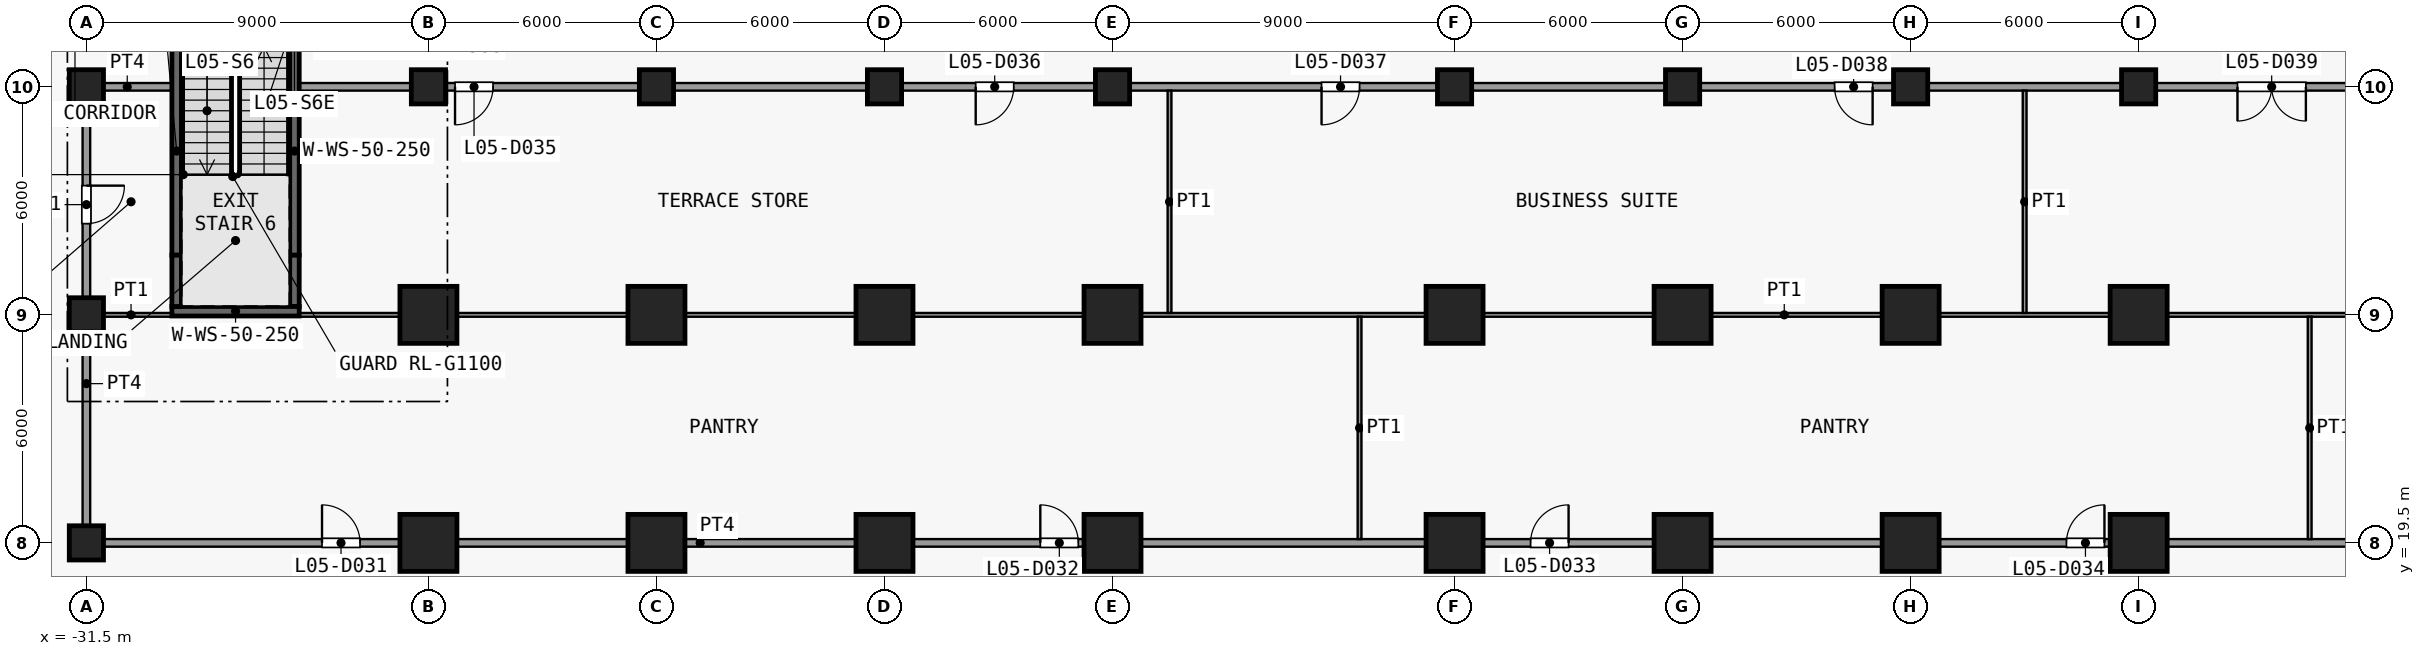
"""IFC4 building model, lengths in metres.
Left out: names, types, materials, properties, quantities, classifications, styles, units other than length and angle.
Written with IfcOpenShell. Run it as: python <this file> out.ifc"""

import sys

from ifc_helpers import new_model, si_unit, direction, frame, frame_2d, origin, origin_2d, place, context, subcontext, project, spatial, rectangle, extrude, element, fill, save


model = new_model("IFC4")
c1 = context("Model", 3, precision=1e-05, world=origin(), true_north=direction((0.0, 1.0)))
c2 = subcontext(c1, "Body", "Model", "MODEL_VIEW")
j1 = project(units=[si_unit("LENGTHUNIT", "METRE"), si_unit("PLANEANGLEUNIT", "RADIAN")], contexts=[c1])
p1 = place(None, origin())
s1 = spatial("IfcSite", under=j1, at=p1, CompositionType="ELEMENT")
p2 = place(p1, origin())
s2 = spatial("IfcBuilding", under=s1, at=p2, CompositionType="ELEMENT")
p3 = place(p2, frame((0.0, 0.0, 28.0)))
s3 = spatial("IfcBuildingStorey", under=s2, at=p3, CompositionType="ELEMENT", Elevation=28.0)
for number, where, z_axis, x_axis in (
    (1, (-31.5, 19.5, 0.0), (0.0, 0.0, 1.0), (1.0, 0.0, 0.0)),
    (2, (-31.5, 25.5, 0.0), (0.0, 0.0, 1.0), (1.0, 0.0, 0.0)),
    (3, (-31.5, 31.5, 0.0), (0.0, 0.0, 1.0), (1.0, 0.0, 0.0)),
):
    element("IfcColumn", number, at=place(p3, frame(where, z_axis=z_axis, x_axis=x_axis)), inside=s3, PredefinedType="COLUMN", context=c2, shape_type="SweptSolid", body=[
        extrude(rectangle(XDim=0.9, YDim=0.9, at=origin_2d()), origin(), (0.0, 0.0, 1.0), 4.5),
    ])
for number, where, z_axis, x_axis in (
    (4, (-22.5, 19.5, 0.0), (0.0, 0.0, 1.0), (1.0, 0.0, 0.0)),
    (5, (-22.5, 25.5, 0.0), (0.0, 0.0, 1.0), (1.0, 0.0, 0.0)),
):
    element("IfcColumn", number, at=place(p3, frame(where, z_axis=z_axis, x_axis=x_axis)), inside=s3, PredefinedType="COLUMN", context=c2, shape_type="SweptSolid", body=[
        extrude(rectangle(XDim=1.5, YDim=1.5, at=origin_2d()), origin(), (0.0, 0.0, 1.0), 4.5),
    ])
p4 = place(p3, frame((-22.5, 31.5, 0.0), z_axis=(0.0, 0.0, 1.0), x_axis=(1.0, 0.0, 0.0)))
e6 = element("IfcColumn", 6, at=p4, inside=s3, PredefinedType="COLUMN", context=c2, shape_type="SweptSolid", body=[
    extrude(rectangle(XDim=0.9, YDim=0.9, at=origin_2d()), origin(), (0.0, 0.0, 1.0), 4.5),
])
for number, where, z_axis, x_axis in (
    (7, (-16.5, 19.5, 0.0), (0.0, 0.0, 1.0), (1.0, 0.0, 0.0)),
    (8, (-16.5, 25.5, 0.0), (0.0, 0.0, 1.0), (1.0, 0.0, 0.0)),
):
    element("IfcColumn", number, at=place(p3, frame(where, z_axis=z_axis, x_axis=x_axis)), inside=s3, PredefinedType="COLUMN", context=c2, shape_type="SweptSolid", body=[
        extrude(rectangle(XDim=1.5, YDim=1.5, at=origin_2d()), origin(), (0.0, 0.0, 1.0), 4.5),
    ])
p5 = place(p3, frame((-16.5, 31.5, 0.0), z_axis=(0.0, 0.0, 1.0), x_axis=(1.0, 0.0, 0.0)))
e9 = element("IfcColumn", 9, at=p5, inside=s3, PredefinedType="COLUMN", context=c2, shape_type="SweptSolid", body=[
    extrude(rectangle(XDim=0.9, YDim=0.9, at=origin_2d()), origin(), (0.0, 0.0, 1.0), 4.5),
])
for number, where, z_axis, x_axis in (
    (10, (-10.5, 19.5, 0.0), (0.0, 0.0, 1.0), (1.0, 0.0, 0.0)),
    (11, (-10.5, 25.5, 0.0), (0.0, 0.0, 1.0), (1.0, 0.0, 0.0)),
):
    element("IfcColumn", number, at=place(p3, frame(where, z_axis=z_axis, x_axis=x_axis)), inside=s3, PredefinedType="COLUMN", context=c2, shape_type="SweptSolid", body=[
        extrude(rectangle(XDim=1.5, YDim=1.5, at=origin_2d()), origin(), (0.0, 0.0, 1.0), 4.5),
    ])
p6 = place(p3, frame((-10.5, 31.5, 0.0), z_axis=(0.0, 0.0, 1.0), x_axis=(1.0, 0.0, 0.0)))
e12 = element("IfcColumn", 12, at=p6, inside=s3, PredefinedType="COLUMN", context=c2, shape_type="SweptSolid", body=[
    extrude(rectangle(XDim=0.9, YDim=0.9, at=origin_2d()), origin(), (0.0, 0.0, 1.0), 4.5),
])
for number, where, z_axis, x_axis in (
    (13, (-4.5, 19.5, 0.0), (0.0, 0.0, 1.0), (1.0, 0.0, 0.0)),
    (14, (-4.5, 25.5, 0.0), (0.0, 0.0, 1.0), (1.0, 0.0, 0.0)),
):
    element("IfcColumn", number, at=place(p3, frame(where, z_axis=z_axis, x_axis=x_axis)), inside=s3, PredefinedType="COLUMN", context=c2, shape_type="SweptSolid", body=[
        extrude(rectangle(XDim=1.5, YDim=1.5, at=origin_2d()), origin(), (0.0, 0.0, 1.0), 4.5),
    ])
p7 = place(p3, frame((-4.5, 31.5, 0.0), z_axis=(0.0, 0.0, 1.0), x_axis=(1.0, 0.0, 0.0)))
e15 = element("IfcColumn", 15, at=p7, inside=s3, PredefinedType="COLUMN", context=c2, shape_type="SweptSolid", body=[
    extrude(rectangle(XDim=0.9, YDim=0.9, at=origin_2d()), origin(), (0.0, 0.0, 1.0), 4.5),
])
for number, where, z_axis, x_axis in (
    (16, (4.5, 19.5, 0.0), (0.0, 0.0, 1.0), (1.0, 0.0, 0.0)),
    (17, (4.5, 25.5, 0.0), (0.0, 0.0, 1.0), (1.0, 0.0, 0.0)),
):
    element("IfcColumn", number, at=place(p3, frame(where, z_axis=z_axis, x_axis=x_axis)), inside=s3, PredefinedType="COLUMN", context=c2, shape_type="SweptSolid", body=[
        extrude(rectangle(XDim=1.5, YDim=1.5, at=origin_2d()), origin(), (0.0, 0.0, 1.0), 4.5),
    ])
p8 = place(p3, frame((4.5, 31.5, 0.0), z_axis=(0.0, 0.0, 1.0), x_axis=(1.0, 0.0, 0.0)))
e18 = element("IfcColumn", 18, at=p8, inside=s3, PredefinedType="COLUMN", context=c2, shape_type="SweptSolid", body=[
    extrude(rectangle(XDim=0.9, YDim=0.9, at=origin_2d()), origin(), (0.0, 0.0, 1.0), 4.5),
])
for number, where, z_axis, x_axis in (
    (19, (10.5, 19.5, 0.0), (0.0, 0.0, 1.0), (1.0, 0.0, 0.0)),
    (20, (10.5, 25.5, 0.0), (0.0, 0.0, 1.0), (1.0, 0.0, 0.0)),
):
    element("IfcColumn", number, at=place(p3, frame(where, z_axis=z_axis, x_axis=x_axis)), inside=s3, PredefinedType="COLUMN", context=c2, shape_type="SweptSolid", body=[
        extrude(rectangle(XDim=1.5, YDim=1.5, at=origin_2d()), origin(), (0.0, 0.0, 1.0), 4.5),
    ])
p9 = place(p3, frame((10.5, 31.5, 0.0), z_axis=(0.0, 0.0, 1.0), x_axis=(1.0, 0.0, 0.0)))
e21 = element("IfcColumn", 21, at=p9, inside=s3, PredefinedType="COLUMN", context=c2, shape_type="SweptSolid", body=[
    extrude(rectangle(XDim=0.9, YDim=0.9, at=origin_2d()), origin(), (0.0, 0.0, 1.0), 4.5),
])
for number, where, z_axis, x_axis in (
    (22, (16.5, 19.5, 0.0), (0.0, 0.0, 1.0), (1.0, 0.0, 0.0)),
    (23, (16.5, 25.5, 0.0), (0.0, 0.0, 1.0), (1.0, 0.0, 0.0)),
):
    element("IfcColumn", number, at=place(p3, frame(where, z_axis=z_axis, x_axis=x_axis)), inside=s3, PredefinedType="COLUMN", context=c2, shape_type="SweptSolid", body=[
        extrude(rectangle(XDim=1.5, YDim=1.5, at=origin_2d()), origin(), (0.0, 0.0, 1.0), 4.5),
    ])
p10 = place(p3, frame((16.5, 31.5, 0.0), z_axis=(0.0, 0.0, 1.0), x_axis=(1.0, 0.0, 0.0)))
e24 = element("IfcColumn", 24, at=p10, inside=s3, PredefinedType="COLUMN", context=c2, shape_type="SweptSolid", body=[
    extrude(rectangle(XDim=0.9, YDim=0.9, at=origin_2d()), origin(), (0.0, 0.0, 1.0), 4.5),
])
for number, where, z_axis, x_axis in (
    (25, (22.5, 19.5, 0.0), (0.0, 0.0, 1.0), (1.0, 0.0, 0.0)),
    (26, (22.5, 25.5, 0.0), (0.0, 0.0, 1.0), (1.0, 0.0, 0.0)),
):
    element("IfcColumn", number, at=place(p3, frame(where, z_axis=z_axis, x_axis=x_axis)), inside=s3, PredefinedType="COLUMN", context=c2, shape_type="SweptSolid", body=[
        extrude(rectangle(XDim=1.5, YDim=1.5, at=origin_2d()), origin(), (0.0, 0.0, 1.0), 4.5),
    ])
p11 = place(p3, frame((22.5, 31.5, 0.0), z_axis=(0.0, 0.0, 1.0), x_axis=(1.0, 0.0, 0.0)))
e27 = element("IfcColumn", 27, at=p11, inside=s3, PredefinedType="COLUMN", context=c2, shape_type="SweptSolid", body=[
    extrude(rectangle(XDim=0.9, YDim=0.9, at=origin_2d()), origin(), (0.0, 0.0, 1.0), 4.5),
])
p12 = place(p3, frame((-29.125, 27.07, 0.0), z_axis=(0.0, 0.0, 1.0), x_axis=(0.0, 1.0, 0.0)))
e28 = element("IfcWall", 28, at=p12, inside=s3, PredefinedType="SHEAR", context=c2, shape_type="SweptSolid", body=[
    extrude(rectangle(XDim=5.48, YDim=0.25, at=frame_2d((2.74, 0.0))), origin(), (0.0, 0.0, 1.0), 4.1),
])
p13 = place(p3, frame((-29.125, 25.72, 0.0), z_axis=(0.0, 0.0, 1.0), x_axis=(0.0, 1.0, 0.0)))
e29 = element("IfcWall", 29, at=p13, inside=s3, PredefinedType="SHEAR", context=c2, shape_type="SweptSolid", body=[
    extrude(rectangle(XDim=1.35, YDim=0.25, at=frame_2d((0.675, 0.0))), origin(), (0.0, 0.0, 1.0), 4.1),
])
p14 = place(p3, frame((-26.025, 27.07, 0.0), z_axis=(0.0, 0.0, 1.0), x_axis=(0.0, 1.0, 0.0)))
e30 = element("IfcWall", 30, at=p14, inside=s3, PredefinedType="SHEAR", context=c2, shape_type="SweptSolid", body=[
    extrude(rectangle(XDim=5.48, YDim=0.25, at=frame_2d((2.74, 0.0))), origin(), (0.0, 0.0, 1.0), 4.1),
])
p15 = place(p3, frame((-26.025, 25.72, 0.0), z_axis=(0.0, 0.0, 1.0), x_axis=(0.0, 1.0, 0.0)))
e31 = element("IfcWall", 31, at=p15, inside=s3, PredefinedType="SHEAR", context=c2, shape_type="SweptSolid", body=[
    extrude(rectangle(XDim=1.35, YDim=0.25, at=frame_2d((0.675, 0.0))), origin(), (0.0, 0.0, 1.0), 4.1),
])
p16 = place(p3, frame((-29.25, 25.595, 0.0), z_axis=(0.0, 0.0, 1.0), x_axis=(1.0, 0.0, 0.0)))
e32 = element("IfcWall", 32, at=p16, inside=s3, PredefinedType="SHEAR", context=c2, shape_type="SweptSolid", body=[
    extrude(rectangle(XDim=3.35, YDim=0.25, at=frame_2d((1.675, 0.0))), origin(), (0.0, 0.0, 1.0), 4.1),
])
p17 = place(p3, frame((-31.6, 19.5, 0.0), z_axis=(0.0, 0.0, 1.0), x_axis=(1.0, 0.0, 0.0)))
e33 = element("IfcWall", 33, at=p17, inside=s3, PredefinedType="PARTITIONING", context=c2, shape_type="SweptSolid", body=[
    extrude(rectangle(XDim=60.1, YDim=0.2, at=frame_2d((30.05, 0.0))), origin(), (0.0, 0.0, 1.0), 4.1),
])
p18 = place(p17, frame((6.3, 0.0, 0.0)))
e34 = element("IfcOpeningElement", 34, at=p18, cuts=e33, PredefinedType="OPENING", context=c2, shape_type="SweptSolid", body=[
    extrude(rectangle(XDim=1.0, YDim=2.1, at=frame_2d((0.5, 1.05))), frame((0.0, 0.11, 0.0), z_axis=(0.0, -1.0, 0.0), x_axis=(1.0, 0.0, 0.0)), (0.0, 0.0, 1.0), 0.22),
])
p19 = place(p17, frame((25.2, 0.0, 0.0)))
e35 = element("IfcOpeningElement", 35, at=p19, cuts=e33, PredefinedType="OPENING", context=c2, shape_type="SweptSolid", body=[
    extrude(rectangle(XDim=1.0, YDim=2.1, at=frame_2d((0.5, 1.05))), frame((0.0, 0.11, 0.0), z_axis=(0.0, -1.0, 0.0), x_axis=(1.0, 0.0, 0.0)), (0.0, 0.0, 1.0), 0.22),
])
p20 = place(p17, frame((38.1, 0.0, 0.0)))
e36 = element("IfcOpeningElement", 36, at=p20, cuts=e33, PredefinedType="OPENING", context=c2, shape_type="SweptSolid", body=[
    extrude(rectangle(XDim=1.0, YDim=2.1, at=frame_2d((0.5, 1.05))), frame((0.0, 0.11, 0.0), z_axis=(0.0, -1.0, 0.0), x_axis=(1.0, 0.0, 0.0)), (0.0, 0.0, 1.0), 0.22),
])
p21 = place(p17, frame((52.2, 0.0, 0.0)))
e37 = element("IfcOpeningElement", 37, at=p21, cuts=e33, PredefinedType="OPENING", context=c2, shape_type="SweptSolid", body=[
    extrude(rectangle(XDim=1.0, YDim=2.1, at=frame_2d((0.5, 1.05))), frame((0.0, 0.11, 0.0), z_axis=(0.0, -1.0, 0.0), x_axis=(1.0, 0.0, 0.0)), (0.0, 0.0, 1.0), 0.22),
])
p22 = place(p3, frame((-31.4, 25.5, 0.0), z_axis=(0.0, 0.0, 1.0), x_axis=(1.0, 0.0, 0.0)))
e38 = element("IfcWall", 38, at=p22, inside=s3, PredefinedType="PARTITIONING", context=c2, shape_type="SweptSolid", body=[
    extrude(rectangle(XDim=2.15, YDim=0.1, at=frame_2d((1.075, 0.0))), origin(), (0.0, 0.0, 1.0), 4.1),
])
p23 = place(p3, frame((-25.9, 25.5, 0.0), z_axis=(0.0, 0.0, 1.0), x_axis=(1.0, 0.0, 0.0)))
e39 = element("IfcWall", 39, at=p23, inside=s3, PredefinedType="PARTITIONING", context=c2, shape_type="SweptSolid", body=[
    extrude(rectangle(XDim=78.15, YDim=0.1, at=frame_2d((39.075, 0.0))), origin(), (0.0, 0.0, 1.0), 4.1),
])
p24 = place(p3, frame((-31.6, 31.5, 0.0), z_axis=(0.0, 0.0, 1.0), x_axis=(1.0, 0.0, 0.0)))
e40 = element("IfcWall", 40, at=p24, inside=s3, PredefinedType="PARTITIONING", context=c2, shape_type="SweptSolid", body=[
    extrude(rectangle(XDim=2.35, YDim=0.2, at=frame_2d((1.175, 0.0))), origin(), (0.0, 0.0, 1.0), 4.1),
])
p25 = place(p3, frame((-25.9, 31.5, 0.0), z_axis=(0.0, 0.0, 1.0), x_axis=(1.0, 0.0, 0.0)))
e41 = element("IfcWall", 41, at=p25, inside=s3, PredefinedType="PARTITIONING", context=c2, shape_type="SweptSolid", body=[
    extrude(rectangle(XDim=78.15, YDim=0.2, at=frame_2d((39.075, 0.0))), origin(), (0.0, 0.0, 1.0), 4.1),
])
p26 = place(p25, frame((4.1, 0.0, 0.0)))
e42 = element("IfcOpeningElement", 42, at=p26, cuts=e41, PredefinedType="OPENING", context=c2, shape_type="SweptSolid", body=[
    extrude(rectangle(XDim=1.0, YDim=2.1, at=frame_2d((0.5, 1.05))), frame((0.0, 0.11, 0.0), z_axis=(0.0, -1.0, 0.0), x_axis=(1.0, 0.0, 0.0)), (0.0, 0.0, 1.0), 0.22),
])
p27 = place(p25, frame((17.8, 0.0, 0.0)))
e43 = element("IfcOpeningElement", 43, at=p27, cuts=e41, PredefinedType="OPENING", context=c2, shape_type="SweptSolid", body=[
    extrude(rectangle(XDim=1.0, YDim=2.1, at=frame_2d((0.5, 1.05))), frame((0.0, 0.11, 0.0), z_axis=(0.0, -1.0, 0.0), x_axis=(1.0, 0.0, 0.0)), (0.0, 0.0, 1.0), 0.22),
])
p28 = place(p25, frame((26.9, 0.0, 0.0)))
e44 = element("IfcOpeningElement", 44, at=p28, cuts=e41, PredefinedType="OPENING", context=c2, shape_type="SweptSolid", body=[
    extrude(rectangle(XDim=1.0, YDim=2.1, at=frame_2d((0.5, 1.05))), frame((0.0, 0.11, 0.0), z_axis=(0.0, -1.0, 0.0), x_axis=(1.0, 0.0, 0.0)), (0.0, 0.0, 1.0), 0.22),
])
p29 = place(p25, frame((40.4, 0.0, 0.0)))
e45 = element("IfcOpeningElement", 45, at=p29, cuts=e41, PredefinedType="OPENING", context=c2, shape_type="SweptSolid", body=[
    extrude(rectangle(XDim=1.0, YDim=2.1, at=frame_2d((0.5, 1.05))), frame((0.0, 0.11, 0.0), z_axis=(0.0, -1.0, 0.0), x_axis=(1.0, 0.0, 0.0)), (0.0, 0.0, 1.0), 0.22),
])
p30 = place(p25, frame((51.0, 0.0, 0.0)))
e46 = element("IfcOpeningElement", 46, at=p30, cuts=e41, PredefinedType="OPENING", context=c2, shape_type="SweptSolid", body=[
    extrude(rectangle(XDim=1.8, YDim=2.1, at=frame_2d((0.9, 1.05))), frame((0.0, 0.11, 0.0), z_axis=(0.0, -1.0, 0.0), x_axis=(1.0, 0.0, 0.0)), (0.0, 0.0, 1.0), 0.22),
])
p31 = place(p25, frame((70.7, 0.0, 0.0)))
e47 = element("IfcOpeningElement", 47, at=p31, cuts=e41, PredefinedType="OPENING", context=c2, shape_type="SweptSolid", body=[
    extrude(rectangle(XDim=1.8, YDim=2.1, at=frame_2d((0.9, 1.05))), frame((0.0, 0.11, 0.0), z_axis=(0.0, -1.0, 0.0), x_axis=(1.0, 0.0, 0.0)), (0.0, 0.0, 1.0), 0.22),
])
p32 = place(p3, frame((-31.5, 19.6, 0.0), z_axis=(0.0, 0.0, 1.0), x_axis=(0.0, 1.0, 0.0)))
e48 = element("IfcWall", 48, at=p32, inside=s3, PredefinedType="PARTITIONING", context=c2, shape_type="SweptSolid", body=[
    extrude(rectangle(XDim=11.8, YDim=0.2, at=frame_2d((5.9, 0.0))), origin(), (0.0, 0.0, 1.0), 4.1),
])
p33 = place(p32, frame((8.3, 0.0, 0.0)))
e49 = element("IfcOpeningElement", 49, at=p33, cuts=e48, PredefinedType="OPENING", context=c2, shape_type="SweptSolid", body=[
    extrude(rectangle(XDim=1.0, YDim=2.1, at=frame_2d((0.5, 1.05))), frame((0.0, 0.11, 0.0), z_axis=(0.0, -1.0, 0.0), x_axis=(1.0, 0.0, 0.0)), (0.0, 0.0, 1.0), 0.22),
])
for number, where, z_axis, x_axis in (
    (50, (-3.0, 25.55, 0.0), (0.0, 0.0, 1.0), (0.0, 1.0, 0.0)),
    (51, (2.0, 19.6, 0.0), (0.0, 0.0, 1.0), (0.0, 1.0, 0.0)),
    (52, (19.5, 25.55, 0.0), (0.0, 0.0, 1.0), (0.0, 1.0, 0.0)),
    (53, (27.0, 19.6, 0.0), (0.0, 0.0, 1.0), (0.0, 1.0, 0.0)),
):
    element("IfcWall", number, at=place(p3, frame(where, z_axis=z_axis, x_axis=x_axis)), inside=s3, PredefinedType="PARTITIONING", context=c2, shape_type="SweptSolid", body=[
        extrude(rectangle(XDim=5.85, YDim=0.1, at=frame_2d((2.925, 0.0))), origin(), (0.0, 0.0, 1.0), 4.1),
    ])
p34 = place(p18, origin())
e54 = element("IfcDoor", 54, at=p34, inside=s3, OperationType="SINGLE_SWING_RIGHT", PredefinedType="DOOR", context=c2, shape_type="SweptSolid", body=[
    extrude(rectangle(XDim=1.0, YDim=2.1, at=frame_2d((0.5, 1.05))), frame((0.0, 0.025, 0.0), z_axis=(0.0, -1.0, 0.0), x_axis=(1.0, 0.0, 0.0)), (0.0, 0.0, 1.0), 0.05),
])
fill(e34, e54)
p35 = place(p19, origin())
e55 = element("IfcDoor", 55, at=p35, inside=s3, OperationType="SINGLE_SWING_RIGHT", PredefinedType="DOOR", context=c2, shape_type="SweptSolid", body=[
    extrude(rectangle(XDim=1.0, YDim=2.1, at=frame_2d((0.5, 1.05))), frame((0.0, 0.025, 0.0), z_axis=(0.0, -1.0, 0.0), x_axis=(1.0, 0.0, 0.0)), (0.0, 0.0, 1.0), 0.05),
])
fill(e35, e55)
p36 = place(p20, origin())
e56 = element("IfcDoor", 56, at=p36, inside=s3, OperationType="SINGLE_SWING_LEFT", PredefinedType="DOOR", context=c2, shape_type="SweptSolid", body=[
    extrude(rectangle(XDim=1.0, YDim=2.1, at=frame_2d((0.5, 1.05))), frame((0.0, 0.025, 0.0), z_axis=(0.0, -1.0, 0.0), x_axis=(1.0, 0.0, 0.0)), (0.0, 0.0, 1.0), 0.05),
])
fill(e36, e56)
p37 = place(p21, origin())
e57 = element("IfcDoor", 57, at=p37, inside=s3, OperationType="SINGLE_SWING_LEFT", PredefinedType="DOOR", context=c2, shape_type="SweptSolid", body=[
    extrude(rectangle(XDim=1.0, YDim=2.1, at=frame_2d((0.5, 1.05))), frame((0.0, 0.025, 0.0), z_axis=(0.0, -1.0, 0.0), x_axis=(1.0, 0.0, 0.0)), (0.0, 0.0, 1.0), 0.05),
])
fill(e37, e57)
p38 = place(p26, origin())
e58 = element("IfcDoor", 58, at=p38, inside=s3, OperationType="SINGLE_SWING_LEFT", PredefinedType="DOOR", context=c2, shape_type="SweptSolid", body=[
    extrude(rectangle(XDim=1.0, YDim=2.1, at=frame_2d((0.5, 1.05))), frame((0.0, 0.025, 0.0), z_axis=(0.0, -1.0, 0.0), x_axis=(1.0, 0.0, 0.0)), (0.0, 0.0, 1.0), 0.05),
])
fill(e42, e58)
p39 = place(p27, origin())
e59 = element("IfcDoor", 59, at=p39, inside=s3, OperationType="SINGLE_SWING_LEFT", PredefinedType="DOOR", context=c2, shape_type="SweptSolid", body=[
    extrude(rectangle(XDim=1.0, YDim=2.1, at=frame_2d((0.5, 1.05))), frame((0.0, 0.025, 0.0), z_axis=(0.0, -1.0, 0.0), x_axis=(1.0, 0.0, 0.0)), (0.0, 0.0, 1.0), 0.05),
])
fill(e43, e59)
p40 = place(p28, origin())
e60 = element("IfcDoor", 60, at=p40, inside=s3, OperationType="SINGLE_SWING_LEFT", PredefinedType="DOOR", context=c2, shape_type="SweptSolid", body=[
    extrude(rectangle(XDim=1.0, YDim=2.1, at=frame_2d((0.5, 1.05))), frame((0.0, 0.025, 0.0), z_axis=(0.0, -1.0, 0.0), x_axis=(1.0, 0.0, 0.0)), (0.0, 0.0, 1.0), 0.05),
])
fill(e44, e60)
p41 = place(p29, origin())
e61 = element("IfcDoor", 61, at=p41, inside=s3, OperationType="SINGLE_SWING_RIGHT", PredefinedType="DOOR", context=c2, shape_type="SweptSolid", body=[
    extrude(rectangle(XDim=1.0, YDim=2.1, at=frame_2d((0.5, 1.05))), frame((0.0, 0.025, 0.0), z_axis=(0.0, -1.0, 0.0), x_axis=(1.0, 0.0, 0.0)), (0.0, 0.0, 1.0), 0.05),
])
fill(e45, e61)
p42 = place(p30, origin())
e62 = element("IfcDoor", 62, at=p42, inside=s3, OperationType="DOUBLE_DOOR_SINGLE_SWING", PredefinedType="DOOR", context=c2, shape_type="SweptSolid", body=[
    extrude(rectangle(XDim=1.8, YDim=2.1, at=frame_2d((0.9, 1.05))), frame((0.0, 0.025, 0.0), z_axis=(0.0, -1.0, 0.0), x_axis=(1.0, 0.0, 0.0)), (0.0, 0.0, 1.0), 0.05),
])
fill(e46, e62)
p43 = place(p33, origin())
e63 = element("IfcDoor", 63, at=p43, inside=s3, OperationType="SINGLE_SWING_RIGHT", PredefinedType="DOOR", context=c2, shape_type="SweptSolid", body=[
    extrude(rectangle(XDim=1.0, YDim=2.1, at=frame_2d((0.5, 1.05))), frame((0.0, 0.025, 0.0), z_axis=(0.0, -1.0, 0.0), x_axis=(1.0, 0.0, 0.0)), (0.0, 0.0, 1.0), 0.05),
])
fill(e49, e63)
save(model, sys.argv[1])
